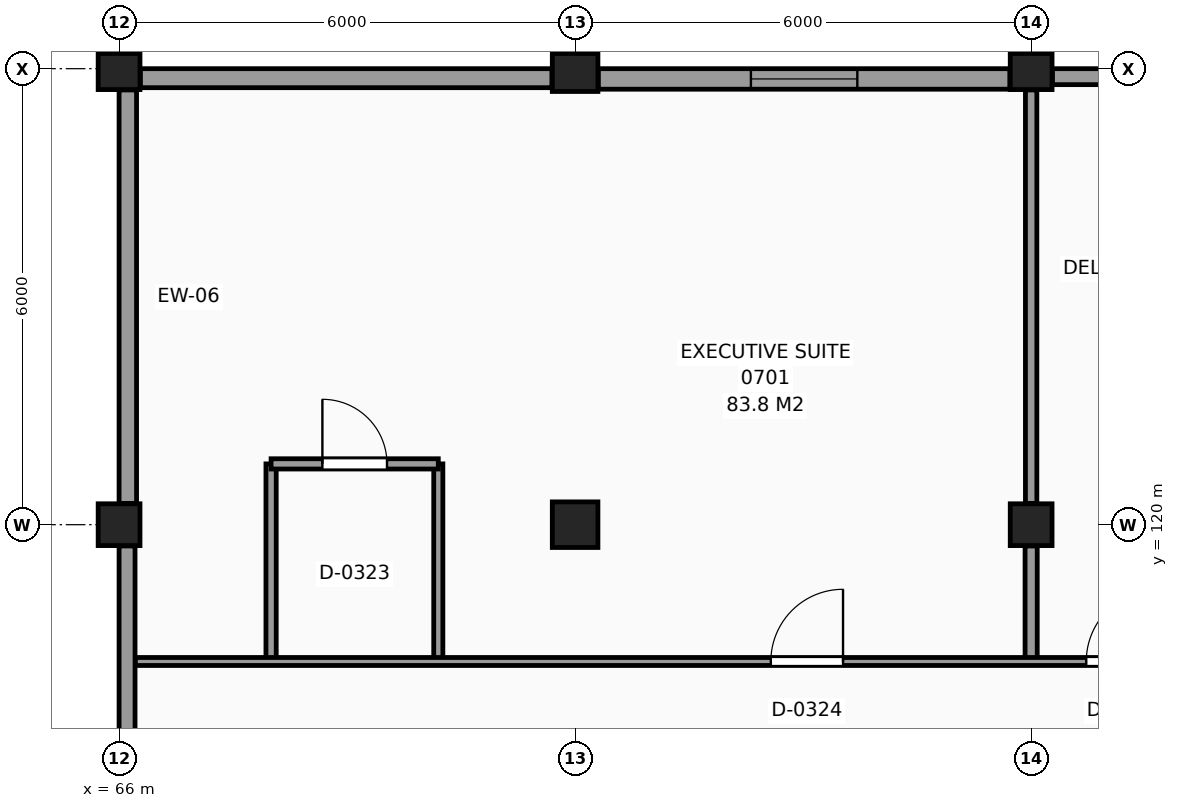
"""IFC4 building model, lengths in metres.
Left out: names, types, materials, properties, quantities, classifications, styles, units other than length and angle.
Written with IfcOpenShell. Run it as: python <this file> out.ifc"""

import sys

from ifc_helpers import new_model, si_unit, direction, frame, frame_2d, origin, origin_2d, place, context, subcontext, project, spatial, rectangle, extrude, element, fill, save


model = new_model("IFC4")
c1 = context("Model", 3, precision=1e-05, world=origin(), true_north=direction((0.0, 1.0)))
c2 = subcontext(c1, "Body", "Model", "MODEL_VIEW")
j1 = project(units=[si_unit("LENGTHUNIT", "METRE"), si_unit("PLANEANGLEUNIT", "RADIAN")], contexts=[c1])
p1 = place(None, origin())
s1 = spatial("IfcSite", under=j1, at=p1, CompositionType="ELEMENT")
p2 = place(p1, origin())
s2 = spatial("IfcBuilding", under=s1, at=p2, CompositionType="ELEMENT")
p3 = place(p2, frame((0.0, 0.0, 31.5)))
s3 = spatial("IfcBuildingStorey", under=s2, at=p3, CompositionType="ELEMENT", Elevation=31.5)
for number, where, z_axis, x_axis in (
    (1, (66.0, 120.0, 0.0), (0.0, 0.0, 1.0), (1.0, 0.0, 0.0)),
    (2, (66.0, 126.0, 0.0), (0.0, 0.0, 1.0), (1.0, 0.0, 0.0)),
):
    element("IfcColumn", number, at=place(p3, frame(where, z_axis=z_axis, x_axis=x_axis)), inside=s3, PredefinedType="COLUMN", context=c2, shape_type="SweptSolid", body=[
        extrude(rectangle(XDim=0.55, YDim=0.55, at=origin_2d()), origin(), (0.0, 0.0, 1.0), 3.3),
    ])
for number, where, z_axis, x_axis in (
    (3, (72.0, 120.0, 0.0), (0.0, 0.0, 1.0), (1.0, 0.0, 0.0)),
    (4, (72.0, 126.0, 0.0), (0.0, 0.0, 1.0), (1.0, 0.0, 0.0)),
):
    element("IfcColumn", number, at=place(p3, frame(where, z_axis=z_axis, x_axis=x_axis)), inside=s3, PredefinedType="COLUMN", context=c2, shape_type="SweptSolid", body=[
        extrude(rectangle(XDim=0.6, YDim=0.6, at=origin_2d()), origin(), (0.0, 0.0, 1.0), 3.3),
    ])
for number, where, z_axis, x_axis in (
    (5, (78.0, 120.0, 0.0), (0.0, 0.0, 1.0), (1.0, 0.0, 0.0)),
    (6, (78.0, 126.0, 0.0), (0.0, 0.0, 1.0), (1.0, 0.0, 0.0)),
):
    element("IfcColumn", number, at=place(p3, frame(where, z_axis=z_axis, x_axis=x_axis)), inside=s3, PredefinedType="COLUMN", context=c2, shape_type="SweptSolid", body=[
        extrude(rectangle(XDim=0.55, YDim=0.55, at=origin_2d()), origin(), (0.0, 0.0, 1.0), 3.3),
    ])
p4 = place(p3, frame((83.695, 125.895, 0.0), z_axis=(0.0, 0.0, 1.0), x_axis=(-1.0, 0.0, 0.0)))
e7 = element("IfcWall", 7, at=p4, inside=s3, PredefinedType="SOLIDWALL", context=c2, shape_type="SweptSolid", body=[
    extrude(rectangle(XDim=5.415, YDim=0.21, at=frame_2d((2.708, 0.0))), origin(), (0.0, 0.0, 1.0), 2.42),
])
p5 = place(p4, frame((2.595, 0.0, 0.8)))
e8 = element("IfcOpeningElement", 8, at=p5, cuts=e7, PredefinedType="OPENING", context=c2, shape_type="SweptSolid", body=[
    extrude(rectangle(XDim=1.4, YDim=1.4, at=frame_2d((0.7, 0.7))), frame((0.0, 0.115, 0.0), z_axis=(0.0, -1.0, 0.0), x_axis=(1.0, 0.0, 0.0)), (0.0, 0.0, 1.0), 0.23),
])
p6 = place(p3, frame((77.72, 125.865, 0.0), z_axis=(0.0, 0.0, 1.0), x_axis=(-1.0, 0.0, 0.0)))
e9 = element("IfcWall", 9, at=p6, inside=s3, PredefinedType="SOLIDWALL", context=c2, shape_type="SweptSolid", body=[
    extrude(rectangle(XDim=5.415, YDim=0.27, at=frame_2d((2.708, 0.0))), origin(), (0.0, 0.0, 1.0), 2.42),
])
p7 = place(p6, frame((2.007, 0.0, 0.8)))
e10 = element("IfcOpeningElement", 10, at=p7, cuts=e9, PredefinedType="OPENING", context=c2, shape_type="SweptSolid", body=[
    extrude(rectangle(XDim=1.4, YDim=1.4, at=frame_2d((0.7, 0.7))), frame((0.0, 0.145, 0.0), z_axis=(0.0, -1.0, 0.0), x_axis=(1.0, 0.0, 0.0)), (0.0, 0.0, 1.0), 0.29),
])
p8 = place(p3, frame((71.695, 125.875, 0.0), z_axis=(0.0, 0.0, 1.0), x_axis=(-1.0, 0.0, 0.0)))
e11 = element("IfcWall", 11, at=p8, inside=s3, PredefinedType="SOLIDWALL", context=c2, shape_type="SweptSolid", body=[
    extrude(rectangle(XDim=5.415, YDim=0.25, at=frame_2d((2.708, 0.0))), origin(), (0.0, 0.0, 1.0), 2.42),
])
p9 = place(p3, frame((66.115, 125.72, 0.0), z_axis=(0.0, 0.0, 1.0), x_axis=(0.0, -1.0, 0.0)))
e12 = element("IfcWall", 12, at=p9, inside=s3, PredefinedType="SOLIDWALL", context=c2, shape_type="SweptSolid", body=[
    extrude(rectangle(XDim=5.44, YDim=0.23, at=frame_2d((2.72, 0.0))), origin(), (0.0, 0.0, 1.0), 2.27),
])
p10 = place(p3, frame((66.105, 119.72, 0.0), z_axis=(0.0, 0.0, 1.0), x_axis=(0.0, -1.0, 0.0)))
e13 = element("IfcWall", 13, at=p10, inside=s3, PredefinedType="SOLIDWALL", context=c2, shape_type="SweptSolid", body=[
    extrude(rectangle(XDim=5.44, YDim=0.21, at=frame_2d((2.72, 0.0))), origin(), (0.0, 0.0, 1.0), 2.27),
])
p11 = place(p3, frame((68.0, 118.2, 0.0), z_axis=(0.0, 0.0, 1.0), x_axis=(0.0, 1.0, 0.0)))
e14 = element("IfcWall", 14, at=p11, inside=s3, PredefinedType="PARTITIONING", context=c2, shape_type="SweptSolid", body=[
    extrude(rectangle(XDim=2.6, YDim=0.135, at=frame_2d((1.3, 0.0))), origin(), (0.0, 0.0, 1.0), 3.07),
])
p12 = place(p3, frame((70.2, 118.2, 0.0), z_axis=(0.0, 0.0, 1.0), x_axis=(0.0, 1.0, 0.0)))
e15 = element("IfcWall", 15, at=p12, inside=s3, PredefinedType="PARTITIONING", context=c2, shape_type="SweptSolid", body=[
    extrude(rectangle(XDim=2.6, YDim=0.12, at=frame_2d((1.3, 0.0))), origin(), (0.0, 0.0, 1.0), 3.07),
])
p13 = place(p3, frame((78.0, 118.2, 0.0), z_axis=(0.0, 0.0, 1.0), x_axis=(0.0, 1.0, 0.0)))
e16 = element("IfcWall", 16, at=p13, inside=s3, PredefinedType="PARTITIONING", context=c2, shape_type="SweptSolid", body=[
    extrude(rectangle(XDim=1.52, YDim=0.16, at=frame_2d((0.76, 0.0))), origin(), (0.0, 0.0, 1.0), 2.52),
])
p14 = place(p3, frame((78.0, 120.28, 0.0), z_axis=(0.0, 0.0, 1.0), x_axis=(0.0, 1.0, 0.0)))
e17 = element("IfcWall", 17, at=p14, inside=s3, PredefinedType="PARTITIONING", context=c2, shape_type="SweptSolid", body=[
    extrude(rectangle(XDim=5.44, YDim=0.15, at=frame_2d((2.72, 0.0))), origin(), (0.0, 0.0, 1.0), 2.57),
])
p15 = place(p3, frame((66.215, 118.2, 0.0), z_axis=(0.0, 0.0, 1.0), x_axis=(1.0, 0.0, 0.0)))
e18 = element("IfcWall", 18, at=p15, inside=s3, PredefinedType="PARTITIONING", context=c2, shape_type="SweptSolid", body=[
    extrude(rectangle(XDim=110.285, YDim=0.105, at=frame_2d((55.143, 0.0))), origin(), (0.0, 0.0, 1.0), 3.07),
])
p16 = place(p15, frame((8.36, 0.0, 0.0)))
e19 = element("IfcOpeningElement", 19, at=p16, cuts=e18, PredefinedType="OPENING", context=c2, shape_type="SweptSolid", body=[
    extrude(rectangle(XDim=0.95, YDim=2.1, at=frame_2d((0.475, 1.05))), frame((0.0, 0.062, 0.0), z_axis=(0.0, -1.0, 0.0), x_axis=(1.0, 0.0, 0.0)), (0.0, 0.0, 1.0), 0.125),
])
p17 = place(p15, frame((12.51, 0.0, 0.0)))
e20 = element("IfcOpeningElement", 20, at=p17, cuts=e18, PredefinedType="OPENING", context=c2, shape_type="SweptSolid", body=[
    extrude(rectangle(XDim=0.95, YDim=2.1, at=frame_2d((0.475, 1.05))), frame((0.0, 0.062, 0.0), z_axis=(0.0, -1.0, 0.0), x_axis=(1.0, 0.0, 0.0)), (0.0, 0.0, 1.0), 0.125),
])
p18 = place(p15, frame((16.91, 0.0, 0.0)))
e21 = element("IfcOpeningElement", 21, at=p18, cuts=e18, PredefinedType="OPENING", context=c2, shape_type="SweptSolid", body=[
    extrude(rectangle(XDim=0.95, YDim=2.1, at=frame_2d((0.475, 1.05))), frame((0.0, 0.062, 0.0), z_axis=(0.0, -1.0, 0.0), x_axis=(1.0, 0.0, 0.0)), (0.0, 0.0, 1.0), 0.125),
])
p19 = place(p15, frame((21.41, 0.0, 0.0)))
e22 = element("IfcOpeningElement", 22, at=p19, cuts=e18, PredefinedType="OPENING", context=c2, shape_type="SweptSolid", body=[
    extrude(rectangle(XDim=0.95, YDim=2.1, at=frame_2d((0.475, 1.05))), frame((0.0, 0.062, 0.0), z_axis=(0.0, -1.0, 0.0), x_axis=(1.0, 0.0, 0.0)), (0.0, 0.0, 1.0), 0.125),
])
p20 = place(p15, frame((30.51, 0.0, 0.0)))
e23 = element("IfcOpeningElement", 23, at=p20, cuts=e18, PredefinedType="OPENING", context=c2, shape_type="SweptSolid", body=[
    extrude(rectangle(XDim=0.95, YDim=2.1, at=frame_2d((0.475, 1.05))), frame((0.0, 0.062, 0.0), z_axis=(0.0, -1.0, 0.0), x_axis=(1.0, 0.0, 0.0)), (0.0, 0.0, 1.0), 0.125),
])
p21 = place(p15, frame((34.91, 0.0, 0.0)))
e24 = element("IfcOpeningElement", 24, at=p21, cuts=e18, PredefinedType="OPENING", context=c2, shape_type="SweptSolid", body=[
    extrude(rectangle(XDim=0.95, YDim=2.1, at=frame_2d((0.475, 1.05))), frame((0.0, 0.062, 0.0), z_axis=(0.0, -1.0, 0.0), x_axis=(1.0, 0.0, 0.0)), (0.0, 0.0, 1.0), 0.125),
])
p22 = place(p15, frame((42.11, 0.0, 0.0)))
e25 = element("IfcOpeningElement", 25, at=p22, cuts=e18, PredefinedType="OPENING", context=c2, shape_type="SweptSolid", body=[
    extrude(rectangle(XDim=0.95, YDim=2.1, at=frame_2d((0.475, 1.05))), frame((0.0, 0.062, 0.0), z_axis=(0.0, -1.0, 0.0), x_axis=(1.0, 0.0, 0.0)), (0.0, 0.0, 1.0), 0.125),
])
p23 = place(p15, frame((50.36, 0.0, 0.0)))
e26 = element("IfcOpeningElement", 26, at=p23, cuts=e18, PredefinedType="OPENING", context=c2, shape_type="SweptSolid", body=[
    extrude(rectangle(XDim=0.95, YDim=2.1, at=frame_2d((0.475, 1.05))), frame((0.0, 0.062, 0.0), z_axis=(0.0, -1.0, 0.0), x_axis=(1.0, 0.0, 0.0)), (0.0, 0.0, 1.0), 0.125),
])
p24 = place(p15, frame((62.36, 0.0, 0.0)))
e27 = element("IfcOpeningElement", 27, at=p24, cuts=e18, PredefinedType="OPENING", context=c2, shape_type="SweptSolid", body=[
    extrude(rectangle(XDim=0.95, YDim=2.1, at=frame_2d((0.475, 1.05))), frame((0.0, 0.062, 0.0), z_axis=(0.0, -1.0, 0.0), x_axis=(1.0, 0.0, 0.0)), (0.0, 0.0, 1.0), 0.125),
])
p25 = place(p15, frame((64.91, 0.0, 0.0)))
e28 = element("IfcOpeningElement", 28, at=p25, cuts=e18, PredefinedType="OPENING", context=c2, shape_type="SweptSolid", body=[
    extrude(rectangle(XDim=0.95, YDim=2.1, at=frame_2d((0.475, 1.05))), frame((0.0, 0.062, 0.0), z_axis=(0.0, -1.0, 0.0), x_axis=(1.0, 0.0, 0.0)), (0.0, 0.0, 1.0), 0.125),
])
p26 = place(p15, frame((72.11, 0.0, 0.0)))
e29 = element("IfcOpeningElement", 29, at=p26, cuts=e18, PredefinedType="OPENING", context=c2, shape_type="SweptSolid", body=[
    extrude(rectangle(XDim=0.95, YDim=2.1, at=frame_2d((0.475, 1.05))), frame((0.0, 0.062, 0.0), z_axis=(0.0, -1.0, 0.0), x_axis=(1.0, 0.0, 0.0)), (0.0, 0.0, 1.0), 0.125),
])
p27 = place(p15, frame((76.31, 0.0, 0.0)))
e30 = element("IfcOpeningElement", 30, at=p27, cuts=e18, PredefinedType="OPENING", context=c2, shape_type="SweptSolid", body=[
    extrude(rectangle(XDim=0.95, YDim=2.1, at=frame_2d((0.475, 1.05))), frame((0.0, 0.062, 0.0), z_axis=(0.0, -1.0, 0.0), x_axis=(1.0, 0.0, 0.0)), (0.0, 0.0, 1.0), 0.125),
])
p28 = place(p15, frame((78.51, 0.0, 0.0)))
e31 = element("IfcOpeningElement", 31, at=p28, cuts=e18, PredefinedType="OPENING", context=c2, shape_type="SweptSolid", body=[
    extrude(rectangle(XDim=0.95, YDim=2.1, at=frame_2d((0.475, 1.05))), frame((0.0, 0.062, 0.0), z_axis=(0.0, -1.0, 0.0), x_axis=(1.0, 0.0, 0.0)), (0.0, 0.0, 1.0), 0.125),
])
p29 = place(p15, frame((84.51, 0.0, 0.0)))
e32 = element("IfcOpeningElement", 32, at=p29, cuts=e18, PredefinedType="OPENING", context=c2, shape_type="SweptSolid", body=[
    extrude(rectangle(XDim=0.95, YDim=2.1, at=frame_2d((0.475, 1.05))), frame((0.0, 0.062, 0.0), z_axis=(0.0, -1.0, 0.0), x_axis=(1.0, 0.0, 0.0)), (0.0, 0.0, 1.0), 0.125),
])
p30 = place(p15, frame((98.36, 0.0, 0.0)))
e33 = element("IfcOpeningElement", 33, at=p30, cuts=e18, PredefinedType="OPENING", context=c2, shape_type="SweptSolid", body=[
    extrude(rectangle(XDim=0.95, YDim=2.1, at=frame_2d((0.475, 1.05))), frame((0.0, 0.062, 0.0), z_axis=(0.0, -1.0, 0.0), x_axis=(1.0, 0.0, 0.0)), (0.0, 0.0, 1.0), 0.125),
])
p31 = place(p15, frame((104.26, 0.0, 0.0)))
e34 = element("IfcOpeningElement", 34, at=p31, cuts=e18, PredefinedType="OPENING", context=c2, shape_type="SweptSolid", body=[
    extrude(rectangle(XDim=0.95, YDim=2.1, at=frame_2d((0.475, 1.05))), frame((0.0, 0.062, 0.0), z_axis=(0.0, -1.0, 0.0), x_axis=(1.0, 0.0, 0.0)), (0.0, 0.0, 1.0), 0.125),
])
p32 = place(p3, frame((68.0, 120.8, 0.0), z_axis=(0.0, 0.0, 1.0), x_axis=(1.0, 0.0, 0.0)))
e35 = element("IfcWall", 35, at=p32, inside=s3, PredefinedType="PARTITIONING", context=c2, shape_type="SweptSolid", body=[
    extrude(rectangle(XDim=2.2, YDim=0.135, at=frame_2d((1.1, 0.0))), origin(), (0.0, 0.0, 1.0), 3.07),
])
p33 = place(p32, frame((0.675, 0.0, 0.0)))
e36 = element("IfcOpeningElement", 36, at=p33, cuts=e35, PredefinedType="OPENING", context=c2, shape_type="SweptSolid", body=[
    extrude(rectangle(XDim=0.85, YDim=2.1, at=frame_2d((0.425, 1.05))), frame((0.0, 0.078, 0.0), z_axis=(0.0, -1.0, 0.0), x_axis=(1.0, 0.0, 0.0)), (0.0, 0.0, 1.0), 0.155),
])
p34 = place(p7, origin())
e37 = element("IfcWindow", 37, at=p34, inside=s3, PartitioningType="SINGLE_PANEL", PredefinedType="WINDOW", context=c2, shape_type="SweptSolid", body=[
    extrude(rectangle(XDim=1.4, YDim=1.4, at=frame_2d((0.7, 0.7))), frame((0.0, 0.03, 0.0), z_axis=(0.0, -1.0, 0.0), x_axis=(1.0, 0.0, 0.0)), (0.0, 0.0, 1.0), 0.06),
])
fill(e10, e37)
p35 = place(p33, origin())
e38 = element("IfcDoor", 38, at=p35, inside=s3, OperationType="SINGLE_SWING_LEFT", PredefinedType="DOOR", context=c2, shape_type="SweptSolid", body=[
    extrude(rectangle(XDim=0.85, YDim=2.1, at=frame_2d((0.425, 1.05))), frame((0.0, 0.025, 0.0), z_axis=(0.0, -1.0, 0.0), x_axis=(1.0, 0.0, 0.0)), (0.0, 0.0, 1.0), 0.05),
])
fill(e36, e38)
p36 = place(p16, origin())
e39 = element("IfcDoor", 39, at=p36, inside=s3, OperationType="SINGLE_SWING_RIGHT", PredefinedType="DOOR", context=c2, shape_type="SweptSolid", body=[
    extrude(rectangle(XDim=0.95, YDim=2.1, at=frame_2d((0.475, 1.05))), frame((0.0, 0.025, 0.0), z_axis=(0.0, -1.0, 0.0), x_axis=(1.0, 0.0, 0.0)), (0.0, 0.0, 1.0), 0.05),
])
fill(e19, e39)
p37 = place(p17, origin())
e40 = element("IfcDoor", 40, at=p37, inside=s3, OperationType="SINGLE_SWING_RIGHT", PredefinedType="DOOR", context=c2, shape_type="SweptSolid", body=[
    extrude(rectangle(XDim=0.95, YDim=2.1, at=frame_2d((0.475, 1.05))), frame((0.0, 0.025, 0.0), z_axis=(0.0, -1.0, 0.0), x_axis=(1.0, 0.0, 0.0)), (0.0, 0.0, 1.0), 0.05),
])
fill(e20, e40)
save(model, sys.argv[1])
